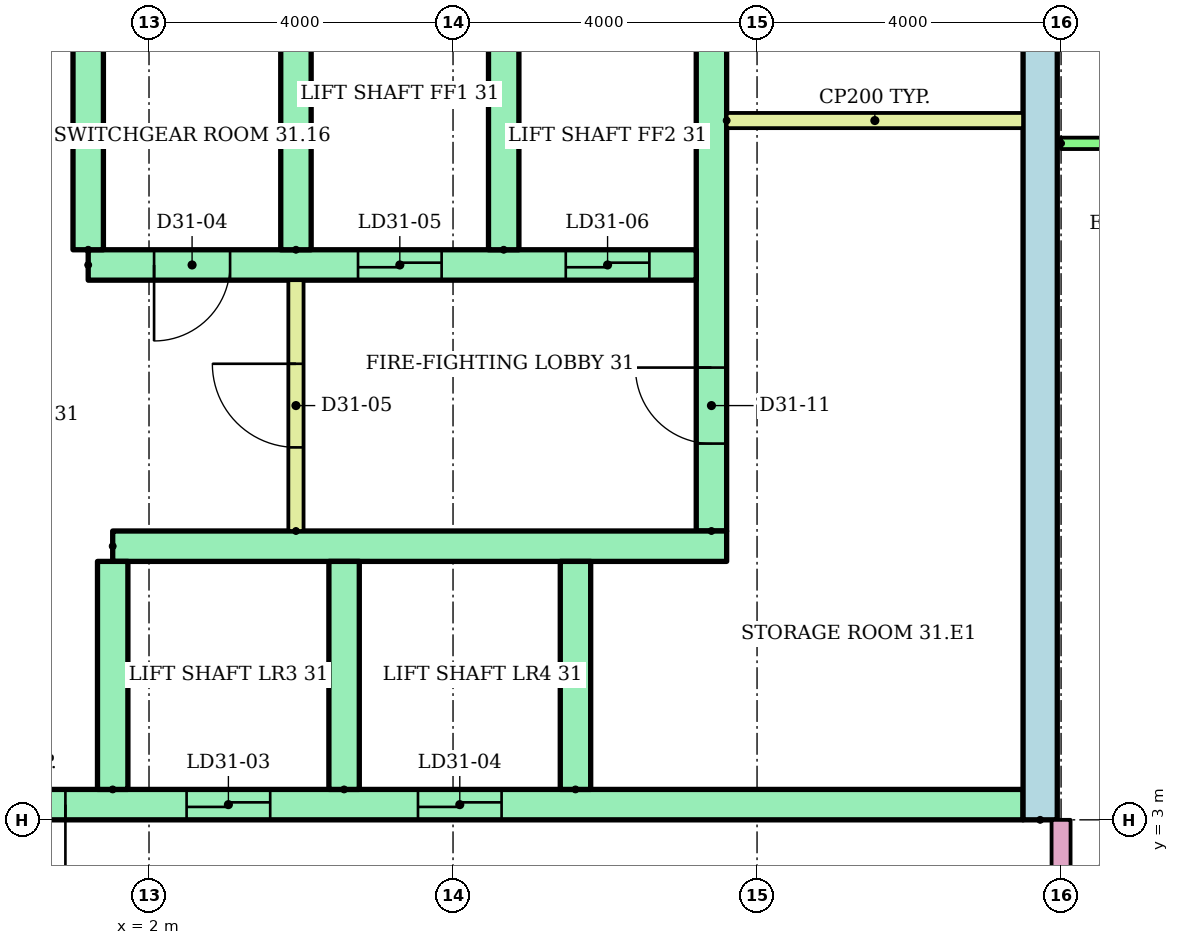
"""IFC4 building model, lengths in metres.
Left out: names, types, materials, properties, quantities, classifications, styles, units other than length and angle.
Written with IfcOpenShell. Run it as: python <this file> out.ifc"""

import sys

from ifc_helpers import new_model, si_unit, direction, frame, frame_2d, origin, place, context, subcontext, project, spatial, rectangle, extrude, element, fill, save


model = new_model("IFC4")
c1 = context("Model", 3, precision=1e-05, world=origin(), true_north=direction((0.0, 1.0)))
c2 = subcontext(c1, "Body", "Model", "MODEL_VIEW")
j1 = project(units=[si_unit("LENGTHUNIT", "METRE"), si_unit("PLANEANGLEUNIT", "RADIAN")], contexts=[c1])
p1 = place(None, origin())
s1 = spatial("IfcSite", under=j1, at=p1, CompositionType="ELEMENT")
p2 = place(p1, origin())
s2 = spatial("IfcBuilding", under=s1, at=p2, CompositionType="ELEMENT")
p3 = place(p2, frame((0.0, 0.0, 123.0)))
s3 = spatial("IfcBuildingStorey", under=s2, at=p3, CompositionType="ELEMENT", Elevation=123.0)
p4 = place(p3, frame((13.725, 3.0, 0.0), z_axis=(0.0, 0.0, 1.0), x_axis=(0.0, 1.0, 0.0)))
e1 = element("IfcWall", 1, at=p4, inside=s3, PredefinedType="SHEAR", context=c2, shape_type="SweptSolid", body=[
    extrude(rectangle(XDim=17.0, YDim=0.45, at=frame_2d((8.5, 0.0))), origin(), (0.0, 0.0, 1.0), 2.92),
])
p5 = place(p3, frame((9.4, 6.8, 0.0), z_axis=(0.0, 0.0, 1.0), x_axis=(0.0, 1.0, 0.0)))
e2 = element("IfcWall", 2, at=p5, inside=s3, PredefinedType="SHEAR", context=c2, shape_type="SweptSolid", body=[
    extrude(rectangle(XDim=12.7, YDim=0.4, at=frame_2d((6.35, 0.0))), origin(), (0.0, 0.0, 1.0), 2.92),
])
p6 = place(p5, frame((1.15, 0.0, 0.0)))
e3 = element("IfcOpeningElement", 3, at=p6, cuts=e2, PredefinedType="OPENING", context=c2, shape_type="SweptSolid", body=[
    extrude(rectangle(XDim=1.0, YDim=2.1, at=frame_2d((0.5, 1.05))), frame((0.0, 0.21, 0.0), z_axis=(0.0, -1.0, 0.0), x_axis=(1.0, 0.0, 0.0)), (0.0, 0.0, 1.0), 0.42),
])
p7 = place(p5, frame((7.925, 0.0, 0.0)))
e4 = element("IfcOpeningElement", 4, at=p7, cuts=e2, PredefinedType="OPENING", context=c2, shape_type="SweptSolid", body=[
    extrude(rectangle(XDim=1.0, YDim=2.1, at=frame_2d((0.5, 1.05))), frame((0.0, 0.21, 0.0), z_axis=(0.0, -1.0, 0.0), x_axis=(1.0, 0.0, 0.0)), (0.0, 0.0, 1.0), 0.42),
])
p8 = place(p3, frame((-13.5, 3.2, 0.0)))
e5 = element("IfcWall", 5, at=p8, inside=s3, PredefinedType="SHEAR", context=c2, shape_type="SweptSolid", body=[
    extrude(rectangle(XDim=27.0, YDim=0.4, at=frame_2d((13.5, 0.0))), origin(), (0.0, 0.0, 1.0), 2.92),
])
p9 = place(p8, frame((6.861, 0.0, 0.0)))
e6 = element("IfcOpeningElement", 6, at=p9, cuts=e5, PredefinedType="OPENING", context=c2, shape_type="SweptSolid", body=[
    extrude(rectangle(XDim=1.1, YDim=2.1, at=frame_2d((0.55, 1.05))), frame((0.0, 0.21, 0.0), z_axis=(0.0, -1.0, 0.0), x_axis=(1.0, 0.0, 0.0)), (0.0, 0.0, 1.0), 0.42),
])
p10 = place(p8, frame((9.906, 0.0, 0.0)))
e7 = element("IfcOpeningElement", 7, at=p10, cuts=e5, PredefinedType="OPENING", context=c2, shape_type="SweptSolid", body=[
    extrude(rectangle(XDim=1.1, YDim=2.1, at=frame_2d((0.55, 1.05))), frame((0.0, 0.21, 0.0), z_axis=(0.0, -1.0, 0.0), x_axis=(1.0, 0.0, 0.0)), (0.0, 0.0, 1.0), 0.42),
])
p11 = place(p8, frame((15.994, 0.0, 0.0)))
e8 = element("IfcOpeningElement", 8, at=p11, cuts=e5, PredefinedType="OPENING", context=c2, shape_type="SweptSolid", body=[
    extrude(rectangle(XDim=1.1, YDim=2.1, at=frame_2d((0.55, 1.05))), frame((0.0, 0.21, 0.0), z_axis=(0.0, -1.0, 0.0), x_axis=(1.0, 0.0, 0.0)), (0.0, 0.0, 1.0), 0.42),
])
p12 = place(p8, frame((19.039, 0.0, 0.0)))
e9 = element("IfcOpeningElement", 9, at=p12, cuts=e5, PredefinedType="OPENING", context=c2, shape_type="SweptSolid", body=[
    extrude(rectangle(XDim=1.1, YDim=2.1, at=frame_2d((0.55, 1.05))), frame((0.0, 0.21, 0.0), z_axis=(0.0, -1.0, 0.0), x_axis=(1.0, 0.0, 0.0)), (0.0, 0.0, 1.0), 0.42),
])
p13 = place(p8, frame((12.6, 0.0, 0.0)))
e10 = element("IfcOpeningElement", 10, at=p13, cuts=e5, PredefinedType="OPENING", context=c2, shape_type="SweptSolid", body=[
    extrude(rectangle(XDim=1.8, YDim=2.1, at=frame_2d((0.9, 1.05))), frame((0.0, 0.21, 0.0), z_axis=(0.0, -1.0, 0.0), x_axis=(1.0, 0.0, 0.0)), (0.0, 0.0, 1.0), 0.42),
])
p14 = place(p3, frame((1.522, 6.6, 0.0)))
e11 = element("IfcWall", 11, at=p14, inside=s3, PredefinedType="SHEAR", context=c2, shape_type="SweptSolid", body=[
    extrude(rectangle(XDim=8.078, YDim=0.4, at=frame_2d((4.039, 0.0))), origin(), (0.0, 0.0, 1.0), 2.92),
])
for number, where, z_axis, x_axis in (
    (12, (1.522, 3.4, 0.0), (0.0, 0.0, 1.0), (0.0, 1.0, 0.0)),
    (13, (4.567, 3.4, 0.0), (0.0, 0.0, 1.0), (0.0, 1.0, 0.0)),
    (14, (7.611, 3.4, 0.0), (0.0, 0.0, 1.0), (0.0, 1.0, 0.0)),
):
    element("IfcWall", number, at=place(p3, frame(where, z_axis=z_axis, x_axis=x_axis)), inside=s3, PredefinedType="SHEAR", context=c2, shape_type="SweptSolid", body=[
        extrude(rectangle(XDim=3.0, YDim=0.4, at=frame_2d((1.5, 0.0))), origin(), (0.0, 0.0, 1.0), 2.92),
    ])
p15 = place(p3, frame((1.2, 10.3, 0.0)))
e15 = element("IfcWall", 15, at=p15, inside=s3, PredefinedType="SHEAR", context=c2, shape_type="SweptSolid", body=[
    extrude(rectangle(XDim=8.0, YDim=0.4, at=frame_2d((4.0, 0.0))), origin(), (0.0, 0.0, 1.0), 2.92),
])
p16 = place(p15, frame((3.55, 0.0, 0.0)))
e16 = element("IfcOpeningElement", 16, at=p16, cuts=e15, PredefinedType="OPENING", context=c2, shape_type="SweptSolid", body=[
    extrude(rectangle(XDim=1.1, YDim=2.1, at=frame_2d((0.55, 1.05))), frame((0.0, 0.21, 0.0), z_axis=(0.0, -1.0, 0.0), x_axis=(1.0, 0.0, 0.0)), (0.0, 0.0, 1.0), 0.42),
])
p17 = place(p15, frame((6.283, 0.0, 0.0)))
e17 = element("IfcOpeningElement", 17, at=p17, cuts=e15, PredefinedType="OPENING", context=c2, shape_type="SweptSolid", body=[
    extrude(rectangle(XDim=1.1, YDim=2.1, at=frame_2d((0.55, 1.05))), frame((0.0, 0.21, 0.0), z_axis=(0.0, -1.0, 0.0), x_axis=(1.0, 0.0, 0.0)), (0.0, 0.0, 1.0), 0.42),
])
p18 = place(p15, frame((0.867, 0.0, 0.0)))
e18 = element("IfcOpeningElement", 18, at=p18, cuts=e15, PredefinedType="OPENING", context=c2, shape_type="SweptSolid", body=[
    extrude(rectangle(XDim=1.0, YDim=2.1, at=frame_2d((0.5, 1.05))), frame((0.0, 0.21, 0.0), z_axis=(0.0, -1.0, 0.0), x_axis=(1.0, 0.0, 0.0)), (0.0, 0.0, 1.0), 0.42),
])
for number, where, z_axis, x_axis in (
    (19, (1.2, 10.5, 0.0), (0.0, 0.0, 1.0), (0.0, 1.0, 0.0)),
    (20, (3.933, 10.5, 0.0), (0.0, 0.0, 1.0), (0.0, 1.0, 0.0)),
    (21, (6.667, 10.5, 0.0), (0.0, 0.0, 1.0), (0.0, 1.0, 0.0)),
):
    element("IfcWall", number, at=place(p3, frame(where, z_axis=z_axis, x_axis=x_axis)), inside=s3, PredefinedType="SHEAR", context=c2, shape_type="SweptSolid", body=[
        extrude(rectangle(XDim=3.0, YDim=0.4, at=frame_2d((1.5, 0.0))), origin(), (0.0, 0.0, 1.0), 2.92),
    ])
p19 = place(p3, frame((3.933, 6.8, 0.0), z_axis=(0.0, 0.0, 1.0), x_axis=(0.0, 1.0, 0.0)))
e22 = element("IfcWall", 22, at=p19, inside=s3, PredefinedType="PARTITIONING", context=c2, shape_type="SweptSolid", body=[
    extrude(rectangle(XDim=3.3, YDim=0.2, at=frame_2d((1.65, 0.0))), origin(), (0.0, 0.0, 1.0), 2.92),
])
p20 = place(p19, frame((1.1, 0.0, 0.0)))
e23 = element("IfcOpeningElement", 23, at=p20, cuts=e22, PredefinedType="OPENING", context=c2, shape_type="SweptSolid", body=[
    extrude(rectangle(XDim=1.1, YDim=2.1, at=frame_2d((0.55, 1.05))), frame((0.0, 0.11, 0.0), z_axis=(0.0, -1.0, 0.0), x_axis=(1.0, 0.0, 0.0)), (0.0, 0.0, 1.0), 0.22),
])
p21 = place(p3, frame((9.6, 12.2, 0.0)))
e24 = element("IfcWall", 24, at=p21, inside=s3, PredefinedType="PARTITIONING", context=c2, shape_type="SweptSolid", body=[
    extrude(rectangle(XDim=3.9, YDim=0.2, at=frame_2d((1.95, 0.0))), origin(), (0.0, 0.0, 1.0), 2.92),
])
p22 = place(p3, frame((14.0, 11.9, 0.0)))
e25 = element("IfcWall", 25, at=p22, inside=s3, PredefinedType="PARTITIONING", context=c2, shape_type="SweptSolid", body=[
    extrude(rectangle(XDim=18.72, YDim=0.15, at=frame_2d((9.36, 0.0))), origin(), (0.0, 0.0, 1.0), 2.4),
])
p23 = place(p22, frame((1.5, 0.0, 0.0)))
e26 = element("IfcOpeningElement", 26, at=p23, cuts=e25, PredefinedType="OPENING", context=c2, shape_type="SweptSolid", body=[
    extrude(rectangle(XDim=1.0, YDim=2.1, at=frame_2d((0.5, 1.05))), frame((0.0, 0.085, 0.0), z_axis=(0.0, -1.0, 0.0), x_axis=(1.0, 0.0, 0.0)), (0.0, 0.0, 1.0), 0.17),
])
p24 = place(p22, frame((7.55, 0.0, 0.0)))
e27 = element("IfcOpeningElement", 27, at=p24, cuts=e25, PredefinedType="OPENING", context=c2, shape_type="SweptSolid", body=[
    extrude(rectangle(XDim=0.9, YDim=2.1, at=frame_2d((0.45, 1.05))), frame((0.0, 0.085, 0.0), z_axis=(0.0, -1.0, 0.0), x_axis=(1.0, 0.0, 0.0)), (0.0, 0.0, 1.0), 0.17),
])
p25 = place(p22, frame((14.8, 0.0, 0.0)))
e28 = element("IfcOpeningElement", 28, at=p25, cuts=e25, PredefinedType="OPENING", context=c2, shape_type="SweptSolid", body=[
    extrude(rectangle(XDim=0.9, YDim=2.1, at=frame_2d((0.45, 1.05))), frame((0.0, 0.085, 0.0), z_axis=(0.0, -1.0, 0.0), x_axis=(1.0, 0.0, 0.0)), (0.0, 0.0, 1.0), 0.17),
])
p26 = place(p3, frame((14.0, 1.4, 0.0), z_axis=(0.0, 0.0, 1.0), x_axis=(0.0, 1.0, 0.0)))
e29 = element("IfcWall", 29, at=p26, inside=s3, PredefinedType="PARTITIONING", context=c2, shape_type="SweptSolid", body=[
    extrude(rectangle(XDim=1.6, YDim=0.25, at=frame_2d((0.8, 0.0))), origin(), (0.0, 0.0, 1.0), 2.4),
])
p27 = place(p11, origin())
e30 = element("IfcDoor", 30, at=p27, inside=s3, OperationType="SLIDING_TO_LEFT", PredefinedType="DOOR", context=c2, shape_type="SweptSolid", body=[
    extrude(rectangle(XDim=1.1, YDim=2.1, at=frame_2d((0.55, 1.05))), frame((0.0, 0.025, 0.0), z_axis=(0.0, -1.0, 0.0), x_axis=(1.0, 0.0, 0.0)), (0.0, 0.0, 1.0), 0.05),
])
fill(e8, e30)
p28 = place(p12, origin())
e31 = element("IfcDoor", 31, at=p28, inside=s3, OperationType="SLIDING_TO_LEFT", PredefinedType="DOOR", context=c2, shape_type="SweptSolid", body=[
    extrude(rectangle(XDim=1.1, YDim=2.1, at=frame_2d((0.55, 1.05))), frame((0.0, 0.025, 0.0), z_axis=(0.0, -1.0, 0.0), x_axis=(1.0, 0.0, 0.0)), (0.0, 0.0, 1.0), 0.05),
])
fill(e9, e31)
p29 = place(p13, frame((1.8, 0.0, 0.0), z_axis=(0.0, 0.0, 1.0), x_axis=(-1.0, 0.0, 0.0)))
e32 = element("IfcDoor", 32, at=p29, inside=s3, OperationType="DOUBLE_DOOR_SINGLE_SWING", PredefinedType="DOOR", context=c2, shape_type="SweptSolid", body=[
    extrude(rectangle(XDim=1.8, YDim=2.1, at=frame_2d((0.9, 1.05))), frame((0.0, 0.025, 0.0), z_axis=(0.0, -1.0, 0.0), x_axis=(1.0, 0.0, 0.0)), (0.0, 0.0, 1.0), 0.05),
])
fill(e10, e32)
p30 = place(p16, origin())
e33 = element("IfcDoor", 33, at=p30, inside=s3, OperationType="SLIDING_TO_LEFT", PredefinedType="DOOR", context=c2, shape_type="SweptSolid", body=[
    extrude(rectangle(XDim=1.1, YDim=2.1, at=frame_2d((0.55, 1.05))), frame((0.0, 0.025, 0.0), z_axis=(0.0, -1.0, 0.0), x_axis=(1.0, 0.0, 0.0)), (0.0, 0.0, 1.0), 0.05),
])
fill(e16, e33)
p31 = place(p17, origin())
e34 = element("IfcDoor", 34, at=p31, inside=s3, OperationType="SLIDING_TO_LEFT", PredefinedType="DOOR", context=c2, shape_type="SweptSolid", body=[
    extrude(rectangle(XDim=1.1, YDim=2.1, at=frame_2d((0.55, 1.05))), frame((0.0, 0.025, 0.0), z_axis=(0.0, -1.0, 0.0), x_axis=(1.0, 0.0, 0.0)), (0.0, 0.0, 1.0), 0.05),
])
fill(e17, e34)
p32 = place(p18, frame((1.0, 0.0, 0.0), z_axis=(0.0, 0.0, 1.0), x_axis=(-1.0, 0.0, 0.0)))
e35 = element("IfcDoor", 35, at=p32, inside=s3, OperationType="SINGLE_SWING_LEFT", PredefinedType="DOOR", context=c2, shape_type="SweptSolid", body=[
    extrude(rectangle(XDim=1.0, YDim=2.1, at=frame_2d((0.5, 1.05))), frame((0.0, 0.025, 0.0), z_axis=(0.0, -1.0, 0.0), x_axis=(1.0, 0.0, 0.0)), (0.0, 0.0, 1.0), 0.05),
])
fill(e18, e35)
p33 = place(p20, origin())
e36 = element("IfcDoor", 36, at=p33, inside=s3, OperationType="SINGLE_SWING_RIGHT", PredefinedType="DOOR", context=c2, shape_type="SweptSolid", body=[
    extrude(rectangle(XDim=1.1, YDim=2.1, at=frame_2d((0.55, 1.05))), frame((0.0, 0.025, 0.0), z_axis=(0.0, -1.0, 0.0), x_axis=(1.0, 0.0, 0.0)), (0.0, 0.0, 1.0), 0.05),
])
fill(e23, e36)
p34 = place(p6, origin())
e37 = element("IfcDoor", 37, at=p34, inside=s3, OperationType="SINGLE_SWING_RIGHT", PredefinedType="DOOR", context=c2, shape_type="SweptSolid", body=[
    extrude(rectangle(XDim=1.0, YDim=2.1, at=frame_2d((0.5, 1.05))), frame((0.0, 0.025, 0.0), z_axis=(0.0, -1.0, 0.0), x_axis=(1.0, 0.0, 0.0)), (0.0, 0.0, 1.0), 0.05),
])
fill(e3, e37)
save(model, sys.argv[1])
